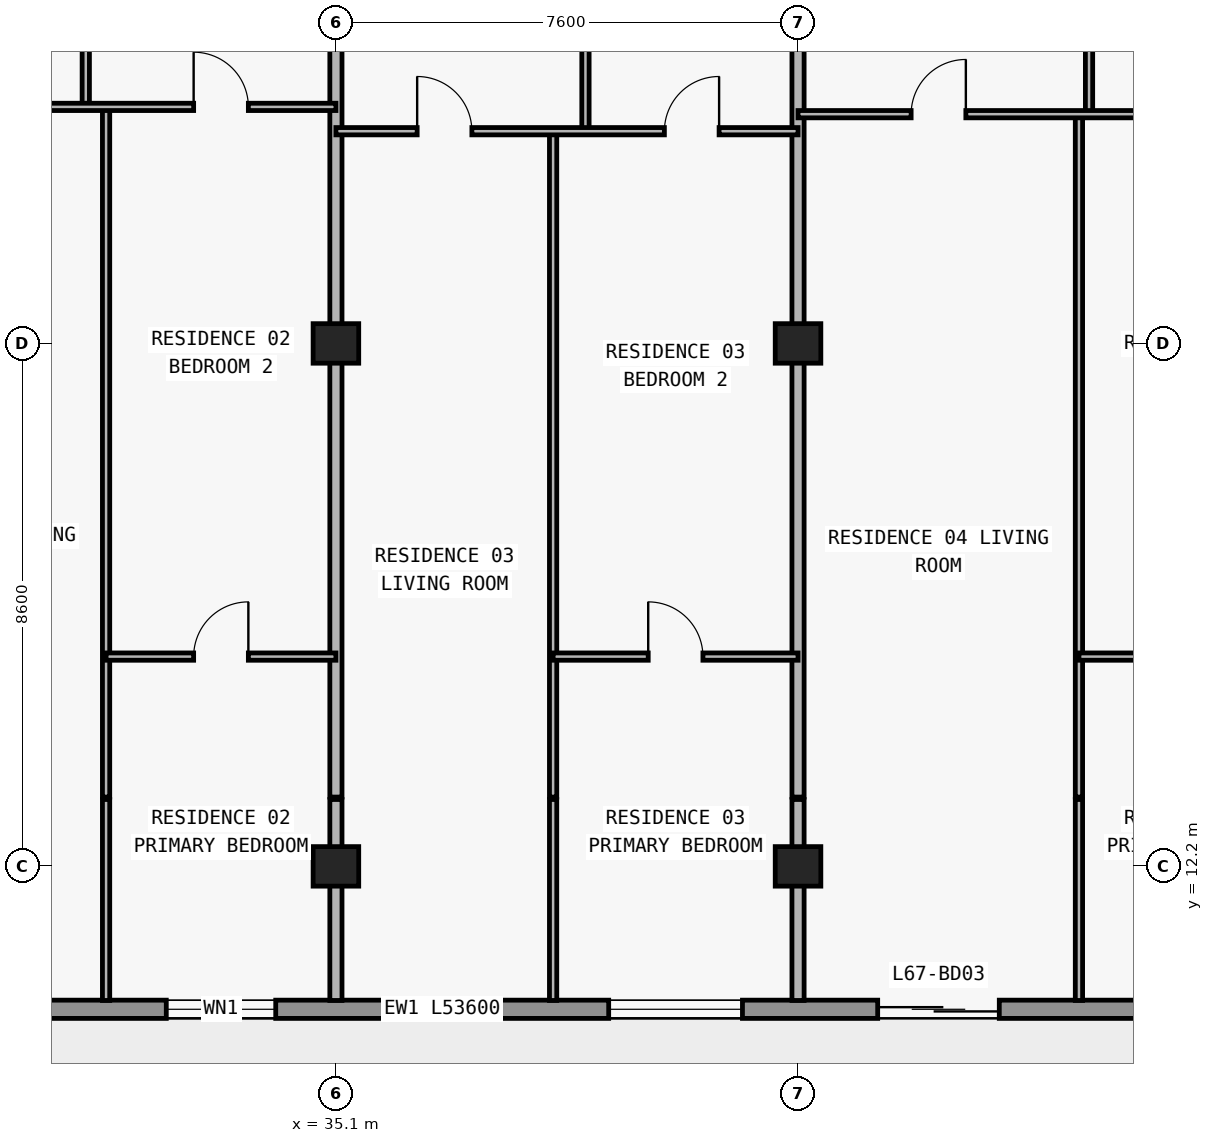
"""IFC4 building model, lengths in metres.
Left out: names, types, materials, properties, quantities, classifications, styles, units other than length and angle.
Written with IfcOpenShell. Run it as: python <this file> out.ifc"""

import sys

from ifc_helpers import new_model, si_unit, direction, frame, frame_2d, origin, origin_2d, place, context, subcontext, project, spatial, rectangle, extrude, element, fill, save


model = new_model("IFC4")
c1 = context("Model", 3, precision=1e-05, world=origin(), true_north=direction((0.0, 1.0)))
c2 = subcontext(c1, "Body", "Model", "MODEL_VIEW")
j1 = project(units=[si_unit("LENGTHUNIT", "METRE"), si_unit("PLANEANGLEUNIT", "RADIAN")], contexts=[c1])
p1 = place(None, origin())
s1 = spatial("IfcSite", under=j1, at=p1, CompositionType="ELEMENT")
p2 = place(p1, origin())
s2 = spatial("IfcBuilding", under=s1, at=p2, CompositionType="ELEMENT")
p3 = place(p2, frame((0.0, 0.0, 239.7)))
s3 = spatial("IfcBuildingStorey", under=s2, at=p3, CompositionType="ELEMENT", Elevation=239.7)
for number, where, z_axis, x_axis in (
    (1, (35.1, 12.2, 0.0), (0.0, 0.0, 1.0), (1.0, 0.0, 0.0)),
    (2, (42.7, 12.2, 0.0), (0.0, 0.0, 1.0), (1.0, 0.0, 0.0)),
    (3, (35.1, 20.8, 0.0), (0.0, 0.0, 1.0), (1.0, 0.0, 0.0)),
    (4, (42.7, 20.8, 0.0), (0.0, 0.0, 1.0), (1.0, 0.0, 0.0)),
):
    element("IfcColumn", number, at=place(p3, frame(where, z_axis=z_axis, x_axis=x_axis)), inside=s3, PredefinedType="COLUMN", context=c2, shape_type="SweptSolid", body=[
        extrude(rectangle(XDim=0.75, YDim=0.65, at=origin_2d()), origin(), (0.0, 0.0, 1.0), 3.05),
    ])
p4 = place(p3, frame((65.7, 9.85, 0.0), z_axis=(0.0, 0.0, 1.0), x_axis=(-1.0, 0.0, 0.0)))
e5 = element("IfcWall", 5, at=p4, inside=s3, PredefinedType="STANDARD", context=c2, shape_type="SweptSolid", body=[
    extrude(rectangle(XDim=53.6, YDim=0.3, at=frame_2d((26.8, 0.0))), origin(), (0.0, 0.0, 1.0), 3.05),
])
p5 = place(p4, frame((49.5, 0.0, 0.0)))
e6 = element("IfcOpeningElement", 6, at=p5, cuts=e5, PredefinedType="OPENING", context=c2, shape_type="SweptSolid", body=[
    extrude(rectangle(XDim=2.0, YDim=2.3, at=frame_2d((1.0, 1.15))), frame((0.0, 0.16, 0.0), z_axis=(0.0, -1.0, 0.0), x_axis=(1.0, 0.0, 0.0)), (0.0, 0.0, 1.0), 0.32),
])
p6 = place(p4, frame((42.1, 0.0, 0.85)))
e7 = element("IfcOpeningElement", 7, at=p6, cuts=e5, PredefinedType="OPENING", context=c2, shape_type="SweptSolid", body=[
    extrude(rectangle(XDim=2.2, YDim=1.55, at=frame_2d((1.1, 0.775))), frame((0.0, 0.16, 0.0), z_axis=(0.0, -1.0, 0.0), x_axis=(1.0, 0.0, 0.0)), (0.0, 0.0, 1.0), 0.32),
])
p7 = place(p4, frame((35.69, 0.0, 0.0)))
e8 = element("IfcOpeningElement", 8, at=p7, cuts=e5, PredefinedType="OPENING", context=c2, shape_type="SweptSolid", body=[
    extrude(rectangle(XDim=2.0, YDim=2.3, at=frame_2d((1.0, 1.15))), frame((0.0, 0.16, 0.0), z_axis=(0.0, -1.0, 0.0), x_axis=(1.0, 0.0, 0.0)), (0.0, 0.0, 1.0), 0.32),
])
p8 = place(p4, frame((31.59, 0.0, 0.85)))
e9 = element("IfcOpeningElement", 9, at=p8, cuts=e5, PredefinedType="OPENING", context=c2, shape_type="SweptSolid", body=[
    extrude(rectangle(XDim=1.8, YDim=1.55, at=frame_2d((0.9, 0.775))), frame((0.0, 0.16, 0.0), z_axis=(0.0, -1.0, 0.0), x_axis=(1.0, 0.0, 0.0)), (0.0, 0.0, 1.0), 0.32),
])
p9 = place(p4, frame((23.914, 0.0, 0.85)))
e10 = element("IfcOpeningElement", 10, at=p9, cuts=e5, PredefinedType="OPENING", context=c2, shape_type="SweptSolid", body=[
    extrude(rectangle(XDim=2.2, YDim=1.55, at=frame_2d((1.1, 0.775))), frame((0.0, 0.16, 0.0), z_axis=(0.0, -1.0, 0.0), x_axis=(1.0, 0.0, 0.0)), (0.0, 0.0, 1.0), 0.32),
])
p10 = place(p4, frame((19.69, 0.0, 0.0)))
e11 = element("IfcOpeningElement", 11, at=p10, cuts=e5, PredefinedType="OPENING", context=c2, shape_type="SweptSolid", body=[
    extrude(rectangle(XDim=2.0, YDim=2.3, at=frame_2d((1.0, 1.15))), frame((0.0, 0.16, 0.0), z_axis=(0.0, -1.0, 0.0), x_axis=(1.0, 0.0, 0.0)), (0.0, 0.0, 1.0), 0.32),
])
p11 = place(p4, frame((15.59, 0.0, 0.85)))
e12 = element("IfcOpeningElement", 12, at=p11, cuts=e5, PredefinedType="OPENING", context=c2, shape_type="SweptSolid", body=[
    extrude(rectangle(XDim=1.8, YDim=1.55, at=frame_2d((0.9, 0.775))), frame((0.0, 0.16, 0.0), z_axis=(0.0, -1.0, 0.0), x_axis=(1.0, 0.0, 0.0)), (0.0, 0.0, 1.0), 0.32),
])
p12 = place(p4, frame((11.69, 0.0, 0.0)))
e13 = element("IfcOpeningElement", 13, at=p12, cuts=e5, PredefinedType="OPENING", context=c2, shape_type="SweptSolid", body=[
    extrude(rectangle(XDim=2.0, YDim=2.3, at=frame_2d((1.0, 1.15))), frame((0.0, 0.16, 0.0), z_axis=(0.0, -1.0, 0.0), x_axis=(1.0, 0.0, 0.0)), (0.0, 0.0, 1.0), 0.32),
])
p13 = place(p4, frame((7.01, 0.0, 0.65)))
e14 = element("IfcOpeningElement", 14, at=p13, cuts=e5, PredefinedType="OPENING", context=c2, shape_type="SweptSolid", body=[
    extrude(rectangle(XDim=2.6, YDim=1.85, at=frame_2d((1.3, 0.925))), frame((0.0, 0.16, 0.0), z_axis=(0.0, -1.0, 0.0), x_axis=(1.0, 0.0, 0.0)), (0.0, 0.0, 1.0), 0.32),
])
p14 = place(p4, frame((2.0, 0.0, 0.85)))
e15 = element("IfcOpeningElement", 15, at=p14, cuts=e5, PredefinedType="OPENING", context=c2, shape_type="SweptSolid", body=[
    extrude(rectangle(XDim=2.2, YDim=1.55, at=frame_2d((1.1, 0.775))), frame((0.0, 0.16, 0.0), z_axis=(0.0, -1.0, 0.0), x_axis=(1.0, 0.0, 0.0)), (0.0, 0.0, 1.0), 0.32),
])
p15 = place(p3, frame((30.986, 24.69, 0.0), z_axis=(0.0, 0.0, 1.0), x_axis=(0.0, 1.0, 0.0)))
e16 = element("IfcWall", 16, at=p15, inside=s3, PredefinedType="PARTITIONING", context=c2, shape_type="SweptSolid", body=[
    extrude(rectangle(XDim=4.71, YDim=0.12, at=frame_2d((2.355, 0.0))), origin(), (0.0, 0.0, 1.0), 2.629),
])
p16 = place(p15, frame((1.905, 0.0, 0.0)))
e17 = element("IfcOpeningElement", 17, at=p16, cuts=e16, PredefinedType="OPENING", context=c2, shape_type="SweptSolid", body=[
    extrude(rectangle(XDim=0.9, YDim=2.15, at=frame_2d((0.45, 1.075))), frame((0.0, 0.07, 0.0), z_axis=(0.0, -1.0, 0.0), x_axis=(1.0, 0.0, 0.0)), (0.0, 0.0, 1.0), 0.14),
])
p17 = place(p3, frame((31.32, 9.995, 0.0), z_axis=(0.0, 0.0, 1.0), x_axis=(0.0, 1.0, 0.0)))
e18 = element("IfcWall", 18, at=p17, inside=s3, PredefinedType="PARTITIONING", context=c2, shape_type="SweptSolid", body=[
    extrude(rectangle(XDim=3.305, YDim=0.12, at=frame_2d((1.652, 0.0))), origin(), (0.0, 0.0, 1.0), 3.05),
])
p18 = place(p3, frame((31.32, 13.34, 0.0), z_axis=(0.0, 0.0, 1.0), x_axis=(0.0, 1.0, 0.0)))
e19 = element("IfcWall", 19, at=p18, inside=s3, PredefinedType="PARTITIONING", context=c2, shape_type="SweptSolid", body=[
    extrude(rectangle(XDim=11.35, YDim=0.12, at=frame_2d((5.675, 0.0))), origin(), (0.0, 0.0, 1.0), 3.05),
])
p19 = place(p3, frame((35.1, 9.995, 0.0), z_axis=(0.0, 0.0, 1.0), x_axis=(0.0, 1.0, 0.0)))
e20 = element("IfcWall", 20, at=p19, inside=s3, PredefinedType="PARTITIONING", context=c2, shape_type="SweptSolid", body=[
    extrude(rectangle(XDim=3.305, YDim=0.2, at=frame_2d((1.652, 0.0))), origin(), (0.0, 0.0, 1.0), 2.263),
])
p20 = place(p3, frame((35.1, 13.34, 0.0), z_axis=(0.0, 0.0, 1.0), x_axis=(0.0, 1.0, 0.0)))
e21 = element("IfcWall", 21, at=p20, inside=s3, PredefinedType="PARTITIONING", context=c2, shape_type="SweptSolid", body=[
    extrude(rectangle(XDim=16.06, YDim=0.2, at=frame_2d((8.03, 0.0))), origin(), (0.0, 0.0, 1.0), 2.263),
])
p21 = place(p3, frame((38.672, 9.995, 0.0), z_axis=(0.0, 0.0, 1.0), x_axis=(0.0, 1.0, 0.0)))
e22 = element("IfcWall", 22, at=p21, inside=s3, PredefinedType="PARTITIONING", context=c2, shape_type="SweptSolid", body=[
    extrude(rectangle(XDim=3.305, YDim=0.12, at=frame_2d((1.652, 0.0))), origin(), (0.0, 0.0, 1.0), 2.629),
])
p22 = place(p3, frame((38.672, 13.34, 0.0), z_axis=(0.0, 0.0, 1.0), x_axis=(0.0, 1.0, 0.0)))
e23 = element("IfcWall", 23, at=p22, inside=s3, PredefinedType="PARTITIONING", context=c2, shape_type="SweptSolid", body=[
    extrude(rectangle(XDim=10.95, YDim=0.12, at=frame_2d((5.475, 0.0))), origin(), (0.0, 0.0, 1.0), 2.629),
])
p23 = place(p3, frame((39.204, 24.29, 0.0), z_axis=(0.0, 0.0, 1.0), x_axis=(0.0, 1.0, 0.0)))
e24 = element("IfcWall", 24, at=p23, inside=s3, PredefinedType="PARTITIONING", context=c2, shape_type="SweptSolid", body=[
    extrude(rectangle(XDim=5.11, YDim=0.12, at=frame_2d((2.555, 0.0))), origin(), (0.0, 0.0, 1.0), 3.05),
])
p24 = place(p23, frame((2.105, 0.0, 0.0)))
e25 = element("IfcOpeningElement", 25, at=p24, cuts=e24, PredefinedType="OPENING", context=c2, shape_type="SweptSolid", body=[
    extrude(rectangle(XDim=0.9, YDim=2.15, at=frame_2d((0.45, 1.075))), frame((0.0, 0.07, 0.0), z_axis=(0.0, -1.0, 0.0), x_axis=(1.0, 0.0, 0.0)), (0.0, 0.0, 1.0), 0.14),
])
p25 = place(p3, frame((42.7, 9.995, 0.0), z_axis=(0.0, 0.0, 1.0), x_axis=(0.0, 1.0, 0.0)))
e26 = element("IfcWall", 26, at=p25, inside=s3, PredefinedType="PARTITIONING", context=c2, shape_type="SweptSolid", body=[
    extrude(rectangle(XDim=3.305, YDim=0.2, at=frame_2d((1.652, 0.0))), origin(), (0.0, 0.0, 1.0), 2.263),
])
p26 = place(p3, frame((42.7, 13.34, 0.0), z_axis=(0.0, 0.0, 1.0), x_axis=(0.0, 1.0, 0.0)))
e27 = element("IfcWall", 27, at=p26, inside=s3, PredefinedType="PARTITIONING", context=c2, shape_type="SweptSolid", body=[
    extrude(rectangle(XDim=16.06, YDim=0.2, at=frame_2d((8.03, 0.0))), origin(), (0.0, 0.0, 1.0), 2.263),
])
p27 = place(p3, frame((47.32, 9.995, 0.0), z_axis=(0.0, 0.0, 1.0), x_axis=(0.0, 1.0, 0.0)))
e28 = element("IfcWall", 28, at=p27, inside=s3, PredefinedType="PARTITIONING", context=c2, shape_type="SweptSolid", body=[
    extrude(rectangle(XDim=3.305, YDim=0.12, at=frame_2d((1.652, 0.0))), origin(), (0.0, 0.0, 1.0), 3.05),
])
p28 = place(p3, frame((47.32, 13.34, 0.0), z_axis=(0.0, 0.0, 1.0), x_axis=(0.0, 1.0, 0.0)))
e29 = element("IfcWall", 29, at=p28, inside=s3, PredefinedType="PARTITIONING", context=c2, shape_type="SweptSolid", body=[
    extrude(rectangle(XDim=11.23, YDim=0.12, at=frame_2d((5.615, 0.0))), origin(), (0.0, 0.0, 1.0), 3.05),
])
p29 = place(p3, frame((47.486, 24.575, 0.0), z_axis=(0.0, 0.0, 1.0), x_axis=(0.0, 1.0, 0.0)))
e30 = element("IfcWall", 30, at=p29, inside=s3, PredefinedType="PARTITIONING", context=c2, shape_type="SweptSolid", body=[
    extrude(rectangle(XDim=4.825, YDim=0.12, at=frame_2d((2.413, 0.0))), origin(), (0.0, 0.0, 1.0), 3.05),
])
p30 = place(p29, frame((1.962, 0.0, 0.0)))
e31 = element("IfcOpeningElement", 31, at=p30, cuts=e30, PredefinedType="OPENING", context=c2, shape_type="SweptSolid", body=[
    extrude(rectangle(XDim=0.9, YDim=2.15, at=frame_2d((0.45, 1.075))), frame((0.0, 0.07, 0.0), z_axis=(0.0, -1.0, 0.0), x_axis=(1.0, 0.0, 0.0)), (0.0, 0.0, 1.0), 0.14),
])
p31 = place(p3, frame((31.32, 15.65, 0.0), z_axis=(0.0, 0.0, 1.0), x_axis=(1.0, 0.0, 0.0)))
e32 = element("IfcWall", 32, at=p31, inside=s3, PredefinedType="PARTITIONING", context=c2, shape_type="SweptSolid", body=[
    extrude(rectangle(XDim=3.78, YDim=0.12, at=frame_2d((1.89, 0.0))), origin(), (0.0, 0.0, 1.0), 3.05),
])
p32 = place(p31, frame((1.44, 0.0, 0.0)))
e33 = element("IfcOpeningElement", 33, at=p32, cuts=e32, PredefinedType="OPENING", context=c2, shape_type="SweptSolid", body=[
    extrude(rectangle(XDim=0.9, YDim=2.15, at=frame_2d((0.45, 1.075))), frame((0.0, 0.07, 0.0), z_axis=(0.0, -1.0, 0.0), x_axis=(1.0, 0.0, 0.0)), (0.0, 0.0, 1.0), 0.14),
])
p33 = place(p3, frame((38.672, 15.65, 0.0), z_axis=(0.0, 0.0, 1.0), x_axis=(1.0, 0.0, 0.0)))
e34 = element("IfcWall", 34, at=p33, inside=s3, PredefinedType="PARTITIONING", context=c2, shape_type="SweptSolid", body=[
    extrude(rectangle(XDim=4.028, YDim=0.12, at=frame_2d((2.014, 0.0))), origin(), (0.0, 0.0, 1.0), 3.05),
])
p34 = place(p33, frame((1.564, 0.0, 0.0)))
e35 = element("IfcOpeningElement", 35, at=p34, cuts=e34, PredefinedType="OPENING", context=c2, shape_type="SweptSolid", body=[
    extrude(rectangle(XDim=0.9, YDim=2.15, at=frame_2d((0.45, 1.075))), frame((0.0, 0.07, 0.0), z_axis=(0.0, -1.0, 0.0), x_axis=(1.0, 0.0, 0.0)), (0.0, 0.0, 1.0), 0.14),
])
p35 = place(p3, frame((47.32, 15.65, 0.0), z_axis=(0.0, 0.0, 1.0), x_axis=(1.0, 0.0, 0.0)))
e36 = element("IfcWall", 36, at=p35, inside=s3, PredefinedType="PARTITIONING", context=c2, shape_type="SweptSolid", body=[
    extrude(rectangle(XDim=3.78, YDim=0.12, at=frame_2d((1.89, 0.0))), origin(), (0.0, 0.0, 1.0), 3.05),
])
p36 = place(p35, frame((1.44, 0.0, 0.0)))
e37 = element("IfcOpeningElement", 37, at=p36, cuts=e36, PredefinedType="OPENING", context=c2, shape_type="SweptSolid", body=[
    extrude(rectangle(XDim=0.9, YDim=2.15, at=frame_2d((0.45, 1.075))), frame((0.0, 0.07, 0.0), z_axis=(0.0, -1.0, 0.0), x_axis=(1.0, 0.0, 0.0)), (0.0, 0.0, 1.0), 0.14),
])
p37 = place(p3, frame((35.1, 24.29, 0.0), z_axis=(0.0, 0.0, 1.0), x_axis=(1.0, 0.0, 0.0)))
e38 = element("IfcWall", 38, at=p37, inside=s3, PredefinedType="PARTITIONING", context=c2, shape_type="SweptSolid", body=[
    extrude(rectangle(XDim=7.6, YDim=0.12, at=frame_2d((3.8, 0.0))), origin(), (0.0, 0.0, 1.0), 3.05),
])
p38 = place(p37, frame((1.336, 0.0, 0.0)))
e39 = element("IfcOpeningElement", 39, at=p38, cuts=e38, PredefinedType="OPENING", context=c2, shape_type="SweptSolid", body=[
    extrude(rectangle(XDim=0.9, YDim=2.15, at=frame_2d((0.45, 1.075))), frame((0.0, 0.07, 0.0), z_axis=(0.0, -1.0, 0.0), x_axis=(1.0, 0.0, 0.0)), (0.0, 0.0, 1.0), 0.14),
])
p39 = place(p37, frame((5.402, 0.0, 0.0)))
e40 = element("IfcOpeningElement", 40, at=p39, cuts=e38, PredefinedType="OPENING", context=c2, shape_type="SweptSolid", body=[
    extrude(rectangle(XDim=0.9, YDim=2.15, at=frame_2d((0.45, 1.075))), frame((0.0, 0.07, 0.0), z_axis=(0.0, -1.0, 0.0), x_axis=(1.0, 0.0, 0.0)), (0.0, 0.0, 1.0), 0.14),
])
p40 = place(p3, frame((42.7, 24.57, 0.0), z_axis=(0.0, 0.0, 1.0), x_axis=(1.0, 0.0, 0.0)))
e41 = element("IfcWall", 41, at=p40, inside=s3, PredefinedType="PARTITIONING", context=c2, shape_type="SweptSolid", body=[
    extrude(rectangle(XDim=8.18, YDim=0.12, at=frame_2d((4.09, 0.0))), origin(), (0.0, 0.0, 1.0), 3.05),
])
p41 = place(p40, frame((1.86, 0.0, 0.0)))
e42 = element("IfcOpeningElement", 42, at=p41, cuts=e41, PredefinedType="OPENING", context=c2, shape_type="SweptSolid", body=[
    extrude(rectangle(XDim=0.9, YDim=2.15, at=frame_2d((0.45, 1.075))), frame((0.0, 0.07, 0.0), z_axis=(0.0, -1.0, 0.0), x_axis=(1.0, 0.0, 0.0)), (0.0, 0.0, 1.0), 0.14),
])
p42 = place(p40, frame((6.033, 0.0, 0.0)))
e43 = element("IfcOpeningElement", 43, at=p42, cuts=e41, PredefinedType="OPENING", context=c2, shape_type="SweptSolid", body=[
    extrude(rectangle(XDim=0.9, YDim=2.15, at=frame_2d((0.45, 1.075))), frame((0.0, 0.07, 0.0), z_axis=(0.0, -1.0, 0.0), x_axis=(1.0, 0.0, 0.0)), (0.0, 0.0, 1.0), 0.14),
])
p43 = place(p3, frame((26.92, 24.69, 0.0), z_axis=(0.0, 0.0, 1.0), x_axis=(1.0, 0.0, 0.0)))
e44 = element("IfcWall", 44, at=p43, inside=s3, PredefinedType="PARTITIONING", context=c2, shape_type="SweptSolid", body=[
    extrude(rectangle(XDim=8.18, YDim=0.12, at=frame_2d((4.09, 0.0))), origin(), (0.0, 0.0, 1.0), 3.05),
])
p44 = place(p43, frame((1.583, 0.0, 0.0)))
e45 = element("IfcOpeningElement", 45, at=p44, cuts=e44, PredefinedType="OPENING", context=c2, shape_type="SweptSolid", body=[
    extrude(rectangle(XDim=0.9, YDim=2.15, at=frame_2d((0.45, 1.075))), frame((0.0, 0.07, 0.0), z_axis=(0.0, -1.0, 0.0), x_axis=(1.0, 0.0, 0.0)), (0.0, 0.0, 1.0), 0.14),
])
p45 = place(p43, frame((5.84, 0.0, 0.0)))
e46 = element("IfcOpeningElement", 46, at=p45, cuts=e44, PredefinedType="OPENING", context=c2, shape_type="SweptSolid", body=[
    extrude(rectangle(XDim=0.9, YDim=2.15, at=frame_2d((0.45, 1.075))), frame((0.0, 0.07, 0.0), z_axis=(0.0, -1.0, 0.0), x_axis=(1.0, 0.0, 0.0)), (0.0, 0.0, 1.0), 0.14),
])
p46 = place(p8, origin())
e47 = element("IfcWindow", 47, at=p46, inside=s3, PartitioningType="SINGLE_PANEL", PredefinedType="WINDOW", context=c2, shape_type="SweptSolid", body=[
    extrude(rectangle(XDim=1.8, YDim=1.55, at=frame_2d((0.9, 0.775))), frame((0.0, 0.03, 0.0), z_axis=(0.0, -1.0, 0.0), x_axis=(1.0, 0.0, 0.0)), (0.0, 0.0, 1.0), 0.06),
])
fill(e9, e47)
p47 = place(p9, origin())
e48 = element("IfcWindow", 48, at=p47, inside=s3, PartitioningType="SINGLE_PANEL", PredefinedType="WINDOW", context=c2, shape_type="SweptSolid", body=[
    extrude(rectangle(XDim=2.2, YDim=1.55, at=frame_2d((1.1, 0.775))), frame((0.0, 0.03, 0.0), z_axis=(0.0, -1.0, 0.0), x_axis=(1.0, 0.0, 0.0)), (0.0, 0.0, 1.0), 0.06),
])
fill(e10, e48)
p48 = place(p10, origin())
e49 = element("IfcDoor", 49, at=p48, inside=s3, OperationType="DOUBLE_DOOR_SLIDING", PredefinedType="DOOR", context=c2, shape_type="SweptSolid", body=[
    extrude(rectangle(XDim=2.0, YDim=2.3, at=frame_2d((1.0, 1.15))), frame((0.0, 0.025, 0.0), z_axis=(0.0, -1.0, 0.0), x_axis=(1.0, 0.0, 0.0)), (0.0, 0.0, 1.0), 0.05),
])
fill(e11, e49)
p49 = place(p45, origin())
e50 = element("IfcDoor", 50, at=p49, inside=s3, OperationType="SINGLE_SWING_LEFT", PredefinedType="DOOR", context=c2, shape_type="SweptSolid", body=[
    extrude(rectangle(XDim=0.9, YDim=2.15, at=frame_2d((0.45, 1.075))), frame((0.0, 0.025, 0.0), z_axis=(0.0, -1.0, 0.0), x_axis=(1.0, 0.0, 0.0)), (0.0, 0.0, 1.0), 0.05),
])
fill(e46, e50)
p50 = place(p32, origin())
e51 = element("IfcDoor", 51, at=p50, inside=s3, OperationType="SINGLE_SWING_RIGHT", PredefinedType="DOOR", context=c2, shape_type="SweptSolid", body=[
    extrude(rectangle(XDim=0.9, YDim=2.15, at=frame_2d((0.45, 1.075))), frame((0.0, 0.025, 0.0), z_axis=(0.0, -1.0, 0.0), x_axis=(1.0, 0.0, 0.0)), (0.0, 0.0, 1.0), 0.05),
])
fill(e33, e51)
p51 = place(p38, origin())
e52 = element("IfcDoor", 52, at=p51, inside=s3, OperationType="SINGLE_SWING_LEFT", PredefinedType="DOOR", context=c2, shape_type="SweptSolid", body=[
    extrude(rectangle(XDim=0.9, YDim=2.15, at=frame_2d((0.45, 1.075))), frame((0.0, 0.025, 0.0), z_axis=(0.0, -1.0, 0.0), x_axis=(1.0, 0.0, 0.0)), (0.0, 0.0, 1.0), 0.05),
])
fill(e39, e52)
p52 = place(p39, origin())
e53 = element("IfcDoor", 53, at=p52, inside=s3, OperationType="SINGLE_SWING_RIGHT", PredefinedType="DOOR", context=c2, shape_type="SweptSolid", body=[
    extrude(rectangle(XDim=0.9, YDim=2.15, at=frame_2d((0.45, 1.075))), frame((0.0, 0.025, 0.0), z_axis=(0.0, -1.0, 0.0), x_axis=(1.0, 0.0, 0.0)), (0.0, 0.0, 1.0), 0.05),
])
fill(e40, e53)
p53 = place(p34, origin())
e54 = element("IfcDoor", 54, at=p53, inside=s3, OperationType="SINGLE_SWING_LEFT", PredefinedType="DOOR", context=c2, shape_type="SweptSolid", body=[
    extrude(rectangle(XDim=0.9, YDim=2.15, at=frame_2d((0.45, 1.075))), frame((0.0, 0.025, 0.0), z_axis=(0.0, -1.0, 0.0), x_axis=(1.0, 0.0, 0.0)), (0.0, 0.0, 1.0), 0.05),
])
fill(e35, e54)
p54 = place(p41, origin())
e55 = element("IfcDoor", 55, at=p54, inside=s3, OperationType="SINGLE_SWING_RIGHT", PredefinedType="DOOR", context=c2, shape_type="SweptSolid", body=[
    extrude(rectangle(XDim=0.9, YDim=2.15, at=frame_2d((0.45, 1.075))), frame((0.0, 0.025, 0.0), z_axis=(0.0, -1.0, 0.0), x_axis=(1.0, 0.0, 0.0)), (0.0, 0.0, 1.0), 0.05),
])
fill(e42, e55)
save(model, sys.argv[1])
